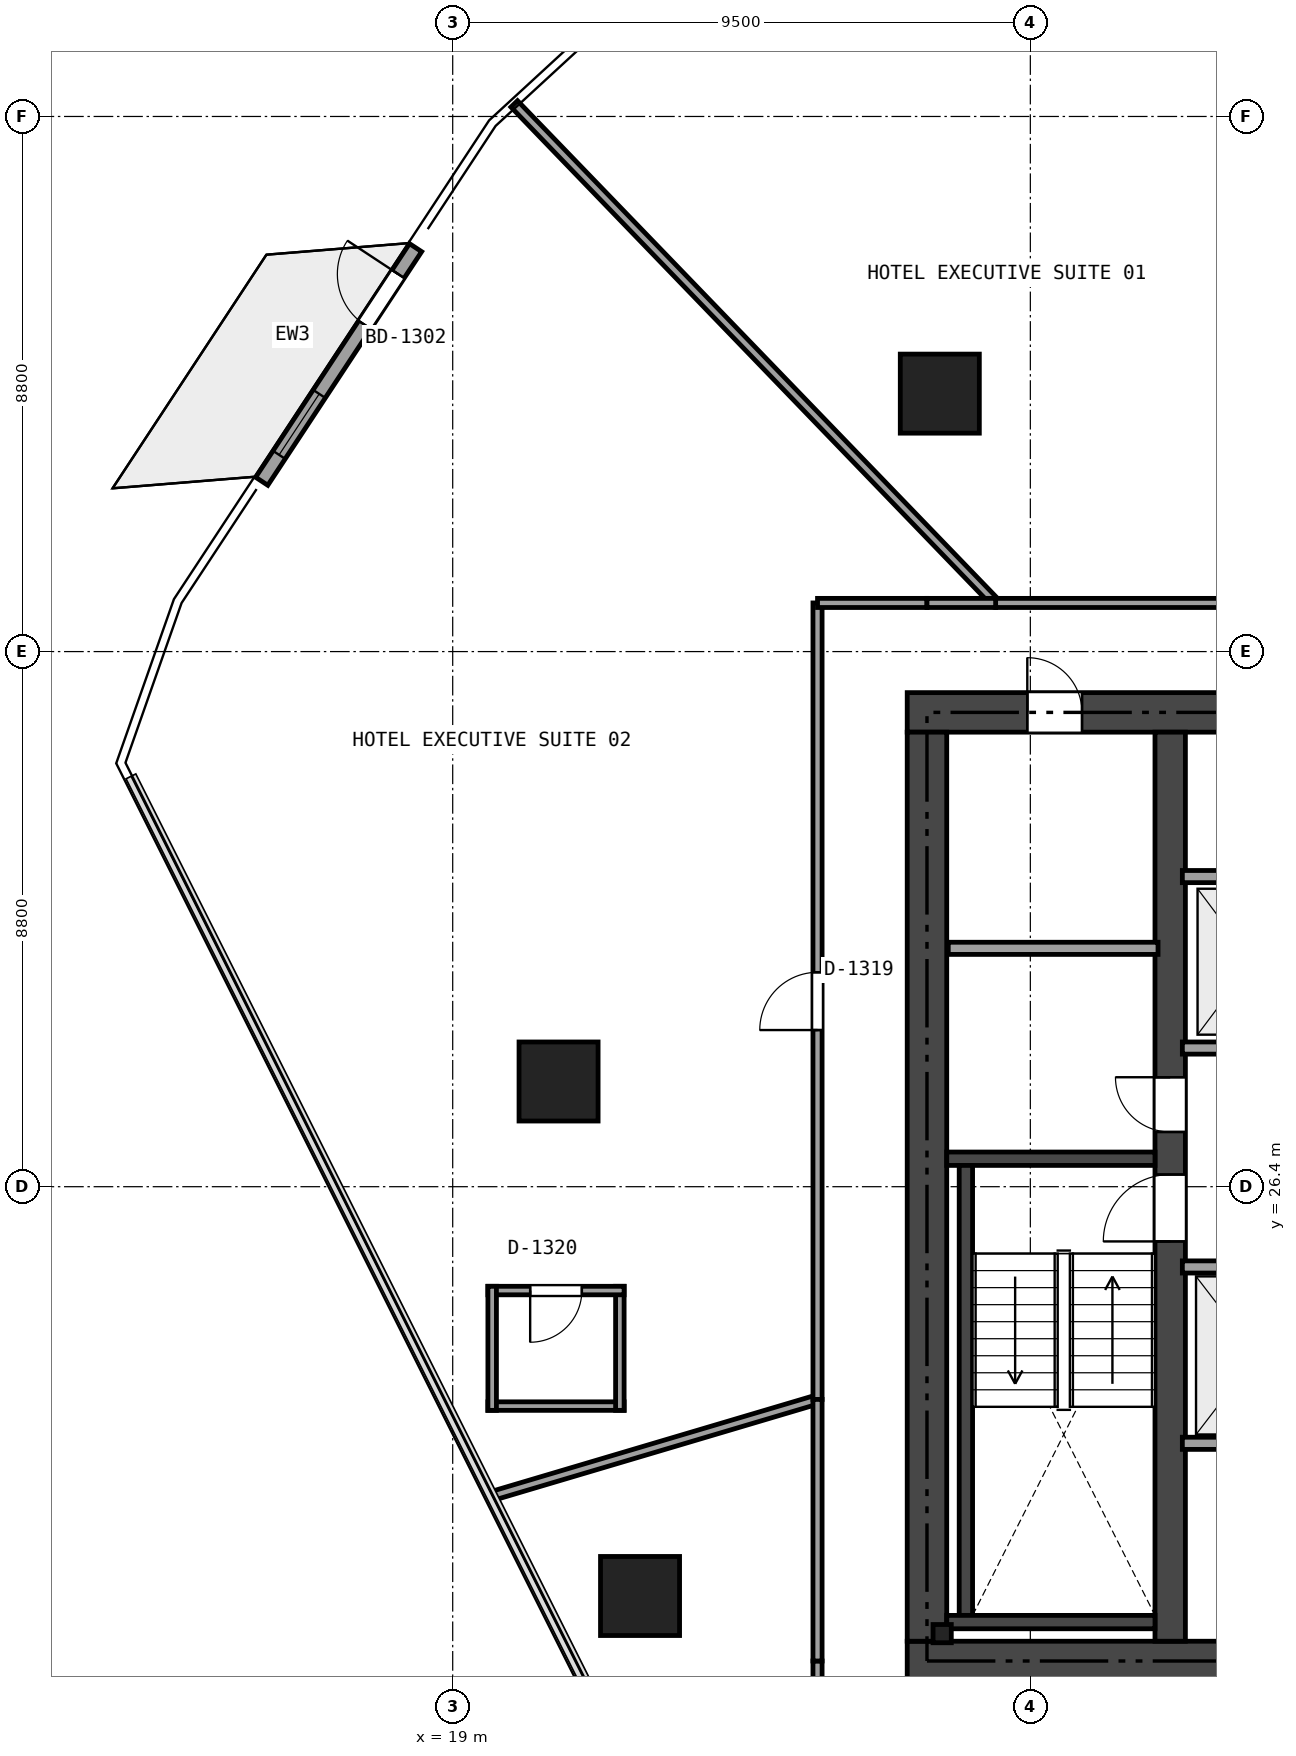
"""IFC4 building model, lengths in metres.
Left out: names, types, materials, properties, quantities, classifications, styles, units other than length and angle.
Written with IfcOpenShell. Run it as: python <this file> out.ifc"""

import sys

from ifc_helpers import new_model, si_unit, direction, frame, frame_2d, origin, origin_2d, place, context, subcontext, project, spatial, rectangle, i_section, extrude, element, fill, save


model = new_model("IFC4")
c1 = context("Model", 3, precision=1e-05, world=origin(), true_north=direction((0.0, 1.0)))
c2 = subcontext(c1, "Body", "Model", "MODEL_VIEW")
j1 = project(units=[si_unit("LENGTHUNIT", "METRE"), si_unit("PLANEANGLEUNIT", "RADIAN")], contexts=[c1])
p1 = place(None, origin())
s1 = spatial("IfcSite", under=j1, at=p1, CompositionType="ELEMENT")
p2 = place(p1, origin())
s2 = spatial("IfcBuilding", under=s1, at=p2, CompositionType="ELEMENT")
p3 = place(p2, frame((0.0, 0.0, 54.6)))
s3 = spatial("IfcBuildingStorey", under=s2, at=p3, CompositionType="ELEMENT", Elevation=54.6)
p4 = place(p3, frame((26.475, 18.6, 0.0), z_axis=(0.0, 0.0, 1.0), x_axis=(1.0, 0.0, 0.0)))
e1 = element("IfcWall", 1, at=p4, inside=s3, PredefinedType="SHEAR", context=c2, shape_type="SweptSolid", body=[
    extrude(rectangle(XDim=21.45, YDim=0.65, at=frame_2d((10.725, 0.0))), origin(), (0.0, 0.0, 1.0), 3.17),
])
p5 = place(p4, frame((12.45, 0.0, 0.0)))
e2 = element("IfcOpeningElement", 2, at=p5, cuts=e1, PredefinedType="OPENING", context=c2, shape_type="SweptSolid", body=[
    extrude(rectangle(XDim=1.15, YDim=2.15, at=frame_2d((0.575, 1.075))), frame((0.0, 0.335, 0.0), z_axis=(0.0, -1.0, 0.0), x_axis=(1.0, 0.0, 0.0)), (0.0, 0.0, 1.0), 0.67),
])
p6 = place(p4, frame((5.275, 0.0, 0.0)))
e3 = element("IfcOpeningElement", 3, at=p6, cuts=e1, PredefinedType="OPENING", context=c2, shape_type="SweptSolid", body=[
    extrude(rectangle(XDim=0.9, YDim=2.1, at=frame_2d((0.45, 1.05))), frame((0.0, 0.335, 0.0), z_axis=(0.0, -1.0, 0.0), x_axis=(1.0, 0.0, 0.0)), (0.0, 0.0, 1.0), 0.67),
])
p7 = place(p3, frame((26.475, 34.2, 0.0), z_axis=(0.0, 0.0, 1.0), x_axis=(1.0, 0.0, 0.0)))
e4 = element("IfcWall", 4, at=p7, inside=s3, PredefinedType="SHEAR", context=c2, shape_type="SweptSolid", body=[
    extrude(rectangle(XDim=21.45, YDim=0.65, at=frame_2d((10.725, 0.0))), origin(), (0.0, 0.0, 1.0), 3.17),
])
p8 = place(p7, frame((9.725, 0.0, 0.0)))
e5 = element("IfcOpeningElement", 5, at=p8, cuts=e4, PredefinedType="OPENING", context=c2, shape_type="SweptSolid", body=[
    extrude(rectangle(XDim=1.1, YDim=2.15, at=frame_2d((0.55, 1.075))), frame((0.0, 0.335, 0.0), z_axis=(0.0, -1.0, 0.0), x_axis=(1.0, 0.0, 0.0)), (0.0, 0.0, 1.0), 0.67),
])
p9 = place(p7, frame((1.975, 0.0, 0.0)))
e6 = element("IfcOpeningElement", 6, at=p9, cuts=e4, PredefinedType="OPENING", context=c2, shape_type="SweptSolid", body=[
    extrude(rectangle(XDim=0.9, YDim=2.1, at=frame_2d((0.45, 1.05))), frame((0.0, 0.335, 0.0), z_axis=(0.0, -1.0, 0.0), x_axis=(1.0, 0.0, 0.0)), (0.0, 0.0, 1.0), 0.67),
])
p10 = place(p7, frame((6.275, 0.0, 0.0)))
e7 = element("IfcOpeningElement", 7, at=p10, cuts=e4, PredefinedType="OPENING", context=c2, shape_type="SweptSolid", body=[
    extrude(rectangle(XDim=0.9, YDim=2.1, at=frame_2d((0.45, 1.05))), frame((0.0, 0.335, 0.0), z_axis=(0.0, -1.0, 0.0), x_axis=(1.0, 0.0, 0.0)), (0.0, 0.0, 1.0), 0.67),
])
p11 = place(p3, frame((26.8, 18.925, 0.0), z_axis=(0.0, 0.0, 1.0), x_axis=(0.0, 1.0, 0.0)))
e8 = element("IfcWall", 8, at=p11, inside=s3, PredefinedType="SHEAR", context=c2, shape_type="SweptSolid", body=[
    extrude(rectangle(XDim=14.95, YDim=0.65, at=frame_2d((7.475, 0.0))), origin(), (0.0, 0.0, 1.0), 3.17),
])
p12 = place(p3, frame((30.8, 18.925, 0.0), z_axis=(0.0, 0.0, 1.0), x_axis=(0.0, 1.0, 0.0)))
e9 = element("IfcWall", 9, at=p12, inside=s3, PredefinedType="SHEAR", context=c2, shape_type="SweptSolid", body=[
    extrude(rectangle(XDim=14.95, YDim=0.5, at=frame_2d((7.475, 0.0))), origin(), (0.0, 0.0, 1.0), 3.17),
])
p13 = place(p12, frame((6.575, 0.0, 0.0)))
e10 = element("IfcOpeningElement", 10, at=p13, cuts=e9, PredefinedType="OPENING", context=c2, shape_type="SweptSolid", body=[
    extrude(rectangle(XDim=1.1, YDim=2.15, at=frame_2d((0.55, 1.075))), frame((0.0, 0.26, 0.0), z_axis=(0.0, -1.0, 0.0), x_axis=(1.0, 0.0, 0.0)), (0.0, 0.0, 1.0), 0.52),
])
p14 = place(p12, frame((8.375, 0.0, 0.0)))
e11 = element("IfcOpeningElement", 11, at=p14, cuts=e9, PredefinedType="OPENING", context=c2, shape_type="SweptSolid", body=[
    extrude(rectangle(XDim=0.9, YDim=2.1, at=frame_2d((0.45, 1.05))), frame((0.0, 0.26, 0.0), z_axis=(0.0, -1.0, 0.0), x_axis=(1.0, 0.0, 0.0)), (0.0, 0.0, 1.0), 0.52),
])
p15 = place(p3, frame((27.125, 26.86, 0.0), z_axis=(0.0, 0.0, 1.0), x_axis=(1.0, 0.0, 0.0)))
e12 = element("IfcWall", 12, at=p15, inside=s3, PredefinedType="SHEAR", context=c2, shape_type="SweptSolid", body=[
    extrude(rectangle(XDim=3.425, YDim=0.22, at=frame_2d((1.712, 0.0))), origin(), (0.0, 0.0, 1.0), 3.17),
])
p16 = place(p3, frame((27.44, 19.35, 0.0), z_axis=(0.0, 0.0, 1.0), x_axis=(0.0, 1.0, 0.0)))
e13 = element("IfcWall", 13, at=p16, inside=s3, PredefinedType="SHEAR", context=c2, shape_type="SweptSolid", body=[
    extrude(rectangle(XDim=7.4, YDim=0.22, at=frame_2d((3.7, 0.0))), origin(), (0.0, 0.0, 1.0), 3.17),
])
p17 = place(p3, frame((27.125, 19.24, 0.0), z_axis=(0.0, 0.0, 1.0), x_axis=(1.0, 0.0, 0.0)))
e14 = element("IfcWall", 14, at=p17, inside=s3, PredefinedType="SHEAR", context=c2, shape_type="SweptSolid", body=[
    extrude(rectangle(XDim=3.425, YDim=0.22, at=frame_2d((1.712, 0.0))), origin(), (0.0, 0.0, 1.0), 3.17),
])
for number, where, z_axis, x_axis in (
    (15, (27.011, 39.442, 0.0), (0.0, 0.0, 1.0), (1.0, 0.0, 0.0)),
    (16, (20.741, 28.13, 0.0), (0.0, 0.0, 1.0), (1.0, 0.0, 0.0)),
    (17, (22.081, 19.669, 0.0), (0.0, 0.0, 1.0), (1.0, 0.0, 0.0)),
):
    element("IfcColumn", number, at=place(p3, frame(where, z_axis=z_axis, x_axis=x_axis)), inside=s3, PredefinedType="COLUMN", context=c2, shape_type="SweptSolid", body=[
        extrude(rectangle(XDim=1.3, YDim=1.3, at=origin_2d()), origin(), (0.0, 0.0, 1.0), 3.17),
    ])
p18 = place(p3, frame((27.05, 19.05, 0.0), z_axis=(0.0, 0.0, 1.0), x_axis=(1.0, 0.0, 0.0)))
e18 = element("IfcColumn", 18, at=p18, inside=s3, PredefinedType="PILASTER", context=c2, shape_type="SweptSolid", body=[
    extrude(i_section(OverallWidth=0.3, OverallDepth=0.3, WebThickness=0.011, FlangeThickness=0.019, at=origin_2d()), origin(), (0.0, 0.0, 1.0), 3.17),
])
p19 = place(p3, frame((15.859, 38.001, 0.0), z_axis=(0.0, 0.0, 1.0), x_axis=(0.549976123516, 0.83518037786, 0.0)))
e19 = element("IfcWall", 19, at=p19, inside=s3, PredefinedType="SOLIDWALL", context=c2, shape_type="SweptSolid", body=[
    extrude(rectangle(XDim=4.6, YDim=0.24, at=frame_2d((2.3, 0.0))), origin(), (0.0, 0.0, 1.0), 3.17),
])
p20 = place(p19, frame((3.08, 0.0, 0.0)))
e20 = element("IfcOpeningElement", 20, at=p20, cuts=e19, PredefinedType="OPENING", context=c2, shape_type="SweptSolid", body=[
    extrude(rectangle(XDim=1.0, YDim=2.15, at=frame_2d((0.5, 1.075))), frame((0.0, 0.13, 0.0), z_axis=(0.0, -1.0, 0.0), x_axis=(1.0, 0.0, 0.0)), (0.0, 0.0, 1.0), 0.26),
])
p21 = place(p19, frame((0.52, 0.0, 0.2)))
e21 = element("IfcOpeningElement", 21, at=p21, cuts=e19, PredefinedType="OPENING", context=c2, shape_type="SweptSolid", body=[
    extrude(rectangle(XDim=1.2, YDim=1.8, at=frame_2d((0.6, 0.9))), frame((0.0, 0.13, 0.0), z_axis=(0.0, -1.0, 0.0), x_axis=(1.0, 0.0, 0.0)), (0.0, 0.0, 1.0), 0.26),
])
p22 = place(p3, frame((27.15, 30.32, 0.0), z_axis=(0.0, 0.0, 1.0), x_axis=(1.0, 0.0, 0.0)))
e22 = element("IfcWall", 22, at=p22, inside=s3, PredefinedType="SOLIDWALL", context=c2, shape_type="SweptSolid", body=[
    extrude(rectangle(XDim=3.45, YDim=0.2, at=frame_2d((1.725, 0.0))), origin(), (0.0, 0.0, 1.0), 3.17),
])
p23 = place(p3, frame((31.0, 28.68, 0.0), z_axis=(0.0, 0.0, 1.0), x_axis=(1.0, 0.0, 0.0)))
e23 = element("IfcWall", 23, at=p23, inside=s3, PredefinedType="SOLIDWALL", context=c2, shape_type="SweptSolid", body=[
    extrude(rectangle(XDim=4.42, YDim=0.2, at=frame_2d((2.21, 0.0))), origin(), (0.0, 0.0, 1.0), 3.17),
])
p24 = place(p23, frame((0.6, 0.0, 0.0)))
e24 = element("IfcOpeningElement", 24, at=p24, cuts=e23, PredefinedType="OPENING", context=c2, shape_type="SweptSolid", body=[
    extrude(rectangle(XDim=1.1, YDim=2.15, at=frame_2d((0.55, 1.075))), frame((0.0, 0.11, 0.0), z_axis=(0.0, -1.0, 0.0), x_axis=(1.0, 0.0, 0.0)), (0.0, 0.0, 1.0), 0.22),
])
p25 = place(p23, frame((2.85, 0.0, 0.0)))
e25 = element("IfcOpeningElement", 25, at=p25, cuts=e23, PredefinedType="OPENING", context=c2, shape_type="SweptSolid", body=[
    extrude(rectangle(XDim=1.1, YDim=2.15, at=frame_2d((0.55, 1.075))), frame((0.0, 0.11, 0.0), z_axis=(0.0, -1.0, 0.0), x_axis=(1.0, 0.0, 0.0)), (0.0, 0.0, 1.0), 0.22),
])
p26 = place(p3, frame((31.0, 31.5, 0.0), z_axis=(0.0, 0.0, 1.0), x_axis=(1.0, 0.0, 0.0)))
e26 = element("IfcWall", 26, at=p26, inside=s3, PredefinedType="SOLIDWALL", context=c2, shape_type="SweptSolid", body=[
    extrude(rectangle(XDim=4.42, YDim=0.2, at=frame_2d((2.21, 0.0))), origin(), (0.0, 0.0, 1.0), 3.17),
])
p27 = place(p3, frame((31.0, 25.08, 0.0), z_axis=(0.0, 0.0, 1.0), x_axis=(1.0, 0.0, 0.0)))
e27 = element("IfcWall", 27, at=p27, inside=s3, PredefinedType="SOLIDWALL", context=c2, shape_type="SweptSolid", body=[
    extrude(rectangle(XDim=4.42, YDim=0.2, at=frame_2d((2.21, 0.0))), origin(), (0.0, 0.0, 1.0), 3.17),
])
p28 = place(p27, frame((3.0, 0.0, 0.0)))
e28 = element("IfcOpeningElement", 28, at=p28, cuts=e27, PredefinedType="OPENING", context=c2, shape_type="SweptSolid", body=[
    extrude(rectangle(XDim=0.9, YDim=2.1, at=frame_2d((0.45, 1.05))), frame((0.0, 0.11, 0.0), z_axis=(0.0, -1.0, 0.0), x_axis=(1.0, 0.0, 0.0)), (0.0, 0.0, 1.0), 0.22),
])
p29 = place(p27, frame((0.62, 0.0, 0.0)))
e29 = element("IfcOpeningElement", 29, at=p29, cuts=e27, PredefinedType="OPENING", context=c2, shape_type="SweptSolid", body=[
    extrude(rectangle(XDim=1.2, YDim=2.15, at=frame_2d((0.6, 1.075))), frame((0.0, 0.11, 0.0), z_axis=(0.0, -1.0, 0.0), x_axis=(1.0, 0.0, 0.0)), (0.0, 0.0, 1.0), 0.22),
])
p30 = place(p3, frame((31.0, 22.18, 0.0), z_axis=(0.0, 0.0, 1.0), x_axis=(1.0, 0.0, 0.0)))
e30 = element("IfcWall", 30, at=p30, inside=s3, PredefinedType="SOLIDWALL", context=c2, shape_type="SweptSolid", body=[
    extrude(rectangle(XDim=2.42, YDim=0.2, at=frame_2d((1.21, 0.0))), origin(), (0.0, 0.0, 1.0), 3.17),
])
p31 = place(p3, frame((19.579, 22.792, 0.0), z_axis=(0.0, 0.0, 1.0), x_axis=(1.0, 0.0, 0.0)))
e31 = element("IfcWall", 31, at=p31, inside=s3, PredefinedType="PARTITIONING", context=c2, shape_type="SweptSolid", body=[
    extrude(rectangle(XDim=2.24, YDim=0.14, at=frame_2d((1.12, 0.0))), origin(), (0.0, 0.0, 1.0), 2.355),
])
p32 = place(p3, frame((21.749, 22.722, 0.0), z_axis=(0.0, 0.0, 1.0), x_axis=(0.0, 1.0, 0.0)))
e32 = element("IfcWall", 32, at=p32, inside=s3, PredefinedType="PARTITIONING", context=c2, shape_type="SweptSolid", body=[
    extrude(rectangle(XDim=2.04, YDim=0.14, at=frame_2d((1.02, 0.0))), origin(), (0.0, 0.0, 1.0), 2.355),
])
p33 = place(p3, frame((21.819, 24.692, 0.0), z_axis=(0.0, 0.0, 1.0), x_axis=(-1.0, 0.0, 0.0)))
e33 = element("IfcWall", 33, at=p33, inside=s3, PredefinedType="PARTITIONING", context=c2, shape_type="SweptSolid", body=[
    extrude(rectangle(XDim=2.24, YDim=0.14, at=frame_2d((1.12, 0.0))), origin(), (0.0, 0.0, 1.0), 2.355),
])
p34 = place(p33, frame((0.695, 0.0, 0.0)))
e34 = element("IfcOpeningElement", 34, at=p34, cuts=e33, PredefinedType="OPENING", context=c2, shape_type="SweptSolid", body=[
    extrude(rectangle(XDim=0.85, YDim=2.1, at=frame_2d((0.425, 1.05))), frame((0.0, 0.08, 0.0), z_axis=(0.0, -1.0, 0.0), x_axis=(1.0, 0.0, 0.0)), (0.0, 0.0, 1.0), 0.16),
])
p35 = place(p3, frame((19.649, 24.762, 0.0), z_axis=(0.0, 0.0, 1.0), x_axis=(0.0, -1.0, 0.0)))
e35 = element("IfcWall", 35, at=p35, inside=s3, PredefinedType="PARTITIONING", context=c2, shape_type="SweptSolid", body=[
    extrude(rectangle(XDim=2.04, YDim=0.14, at=frame_2d((1.02, 0.0))), origin(), (0.0, 0.0, 1.0), 3.17),
])
p36 = place(p3, frame((20.012, 44.207, 0.0), z_axis=(0.0, 0.0, 1.0), x_axis=(0.694275025098, -0.719709795352, 0.0)))
e36 = element("IfcWall", 36, at=p36, inside=s3, PredefinedType="PARTITIONING", context=c2, shape_type="SweptSolid", body=[
    extrude(rectangle(XDim=11.403, YDim=0.15, at=frame_2d((5.702, 0.0))), origin(), (0.0, 0.0, 1.0), 2.355),
])
p37 = place(p3, frame((27.929, 36.0, 0.0), z_axis=(0.0, 0.0, 1.0), x_axis=(1.0, 0.0, 0.0)))
e37 = element("IfcWall", 37, at=p37, inside=s3, PredefinedType="PARTITIONING", context=c2, shape_type="SweptSolid", body=[
    extrude(rectangle(XDim=12.765, YDim=0.15, at=frame_2d((6.383, 0.0))), origin(), (0.0, 0.0, 1.0), 2.395),
])
p38 = place(p37, frame((5.908, 0.0, 0.0)))
e38 = element("IfcOpeningElement", 38, at=p38, cuts=e37, PredefinedType="OPENING", context=c2, shape_type="SweptSolid", body=[
    extrude(rectangle(XDim=0.95, YDim=2.15, at=frame_2d((0.475, 1.075))), frame((0.0, 0.085, 0.0), z_axis=(0.0, -1.0, 0.0), x_axis=(1.0, 0.0, 0.0)), (0.0, 0.0, 1.0), 0.17),
])
p39 = place(p3, frame((19.604, 21.301, 0.0), z_axis=(0.0, 0.0, 1.0), x_axis=(0.958688645274, 0.284457521297, 0.0)))
e39 = element("IfcWall", 39, at=p39, inside=s3, PredefinedType="PARTITIONING", context=c2, shape_type="SweptSolid", body=[
    extrude(rectangle(XDim=5.628, YDim=0.15, at=frame_2d((2.814, 0.0))), origin(), (0.0, 0.0, 1.0), 2.355),
])
p40 = place(p3, frame((25.0, 22.902, 0.0), z_axis=(0.0, 0.0, 1.0), x_axis=(0.0, 1.0, 0.0)))
e40 = element("IfcWall", 40, at=p40, inside=s3, PredefinedType="PARTITIONING", context=c2, shape_type="SweptSolid", body=[
    extrude(rectangle(XDim=13.098, YDim=0.15, at=frame_2d((6.549, 0.0))), origin(), (0.0, 0.0, 1.0), 2.355),
])
p41 = place(p40, frame((6.074, 0.0, 0.0)))
e41 = element("IfcOpeningElement", 41, at=p41, cuts=e40, PredefinedType="OPENING", context=c2, shape_type="SweptSolid", body=[
    extrude(rectangle(XDim=0.95, YDim=2.15, at=frame_2d((0.475, 1.075))), frame((0.0, 0.085, 0.0), z_axis=(0.0, -1.0, 0.0), x_axis=(1.0, 0.0, 0.0)), (0.0, 0.0, 1.0), 0.17),
])
p42 = place(p3, frame((25.0, 36.0, 0.0), z_axis=(0.0, 0.0, 1.0), x_axis=(1.0, 0.0, 0.0)))
e42 = element("IfcWall", 42, at=p42, inside=s3, PredefinedType="PARTITIONING", context=c2, shape_type="SweptSolid", body=[
    extrude(rectangle(XDim=1.8, YDim=0.15, at=frame_2d((0.9, 0.0))), origin(), (0.0, 0.0, 1.0), 2.355),
])
p43 = place(p3, frame((26.8, 36.0, 0.0), z_axis=(0.0, 0.0, 1.0), x_axis=(1.0, 0.0, 0.0)))
e43 = element("IfcWall", 43, at=p43, inside=s3, PredefinedType="PARTITIONING", context=c2, shape_type="SweptSolid", body=[
    extrude(rectangle(XDim=1.129, YDim=0.15, at=frame_2d((0.564, 0.0))), origin(), (0.0, 0.0, 1.0), 2.747),
])
p44 = place(p3, frame((25.0, 16.8, 0.0), z_axis=(0.0, 0.0, 1.0), x_axis=(0.0, 1.0, 0.0)))
e44 = element("IfcWall", 44, at=p44, inside=s3, PredefinedType="PARTITIONING", context=c2, shape_type="SweptSolid", body=[
    extrude(rectangle(XDim=1.8, YDim=0.15, at=frame_2d((0.9, 0.0))), origin(), (0.0, 0.0, 1.0), 2.355),
])
p45 = place(p3, frame((25.0, 18.6, 0.0), z_axis=(0.0, 0.0, 1.0), x_axis=(0.0, 1.0, 0.0)))
e45 = element("IfcWall", 45, at=p45, inside=s3, PredefinedType="PARTITIONING", context=c2, shape_type="SweptSolid", body=[
    extrude(rectangle(XDim=4.302, YDim=0.15, at=frame_2d((2.151, 0.0))), origin(), (0.0, 0.0, 1.0), 2.395),
])
p46 = place(p20, origin())
e46 = element("IfcDoor", 46, at=p46, inside=s3, OperationType="SINGLE_SWING_RIGHT", PredefinedType="DOOR", context=c2, shape_type="SweptSolid", body=[
    extrude(rectangle(XDim=1.0, YDim=2.15, at=frame_2d((0.5, 1.075))), frame((0.0, 0.025, 0.0), z_axis=(0.0, -1.0, 0.0), x_axis=(1.0, 0.0, 0.0)), (0.0, 0.0, 1.0), 0.05),
])
fill(e20, e46)
p47 = place(p21, origin())
e47 = element("IfcWindow", 47, at=p47, inside=s3, PartitioningType="SINGLE_PANEL", PredefinedType="WINDOW", context=c2, shape_type="SweptSolid", body=[
    extrude(rectangle(XDim=1.2, YDim=1.8, at=frame_2d((0.6, 0.9))), frame((0.0, 0.03, 0.0), z_axis=(0.0, -1.0, 0.0), x_axis=(1.0, 0.0, 0.0)), (0.0, 0.0, 1.0), 0.06),
])
fill(e21, e47)
p48 = place(p13, origin())
e48 = element("IfcDoor", 48, at=p48, inside=s3, OperationType="SINGLE_SWING_LEFT", PredefinedType="DOOR", context=c2, shape_type="SweptSolid", body=[
    extrude(rectangle(XDim=1.1, YDim=2.15, at=frame_2d((0.55, 1.075))), frame((0.0, 0.025, 0.0), z_axis=(0.0, -1.0, 0.0), x_axis=(1.0, 0.0, 0.0)), (0.0, 0.0, 1.0), 0.05),
])
fill(e10, e48)
p49 = place(p14, origin())
e49 = element("IfcDoor", 49, at=p49, inside=s3, OperationType="SINGLE_SWING_RIGHT", PredefinedType="DOOR", context=c2, shape_type="SweptSolid", body=[
    extrude(rectangle(XDim=0.9, YDim=2.1, at=frame_2d((0.45, 1.05))), frame((0.0, 0.025, 0.0), z_axis=(0.0, -1.0, 0.0), x_axis=(1.0, 0.0, 0.0)), (0.0, 0.0, 1.0), 0.05),
])
fill(e11, e49)
p50 = place(p9, origin())
e50 = element("IfcDoor", 50, at=p50, inside=s3, OperationType="SINGLE_SWING_LEFT", PredefinedType="DOOR", context=c2, shape_type="SweptSolid", body=[
    extrude(rectangle(XDim=0.9, YDim=2.1, at=frame_2d((0.45, 1.05))), frame((0.0, 0.025, 0.0), z_axis=(0.0, -1.0, 0.0), x_axis=(1.0, 0.0, 0.0)), (0.0, 0.0, 1.0), 0.05),
])
fill(e6, e50)
p51 = place(p41, origin())
e51 = element("IfcDoor", 51, at=p51, inside=s3, OperationType="SINGLE_SWING_LEFT", PredefinedType="DOOR", context=c2, shape_type="SweptSolid", body=[
    extrude(rectangle(XDim=0.95, YDim=2.15, at=frame_2d((0.475, 1.075))), frame((0.0, 0.025, 0.0), z_axis=(0.0, -1.0, 0.0), x_axis=(1.0, 0.0, 0.0)), (0.0, 0.0, 1.0), 0.05),
])
fill(e41, e51)
p52 = place(p34, origin())
e52 = element("IfcDoor", 52, at=p52, inside=s3, OperationType="SINGLE_SWING_RIGHT", PredefinedType="DOOR", context=c2, shape_type="SweptSolid", body=[
    extrude(rectangle(XDim=0.85, YDim=2.1, at=frame_2d((0.425, 1.05))), frame((0.0, 0.025, 0.0), z_axis=(0.0, -1.0, 0.0), x_axis=(1.0, 0.0, 0.0)), (0.0, 0.0, 1.0), 0.05),
])
fill(e34, e52)
save(model, sys.argv[1])
